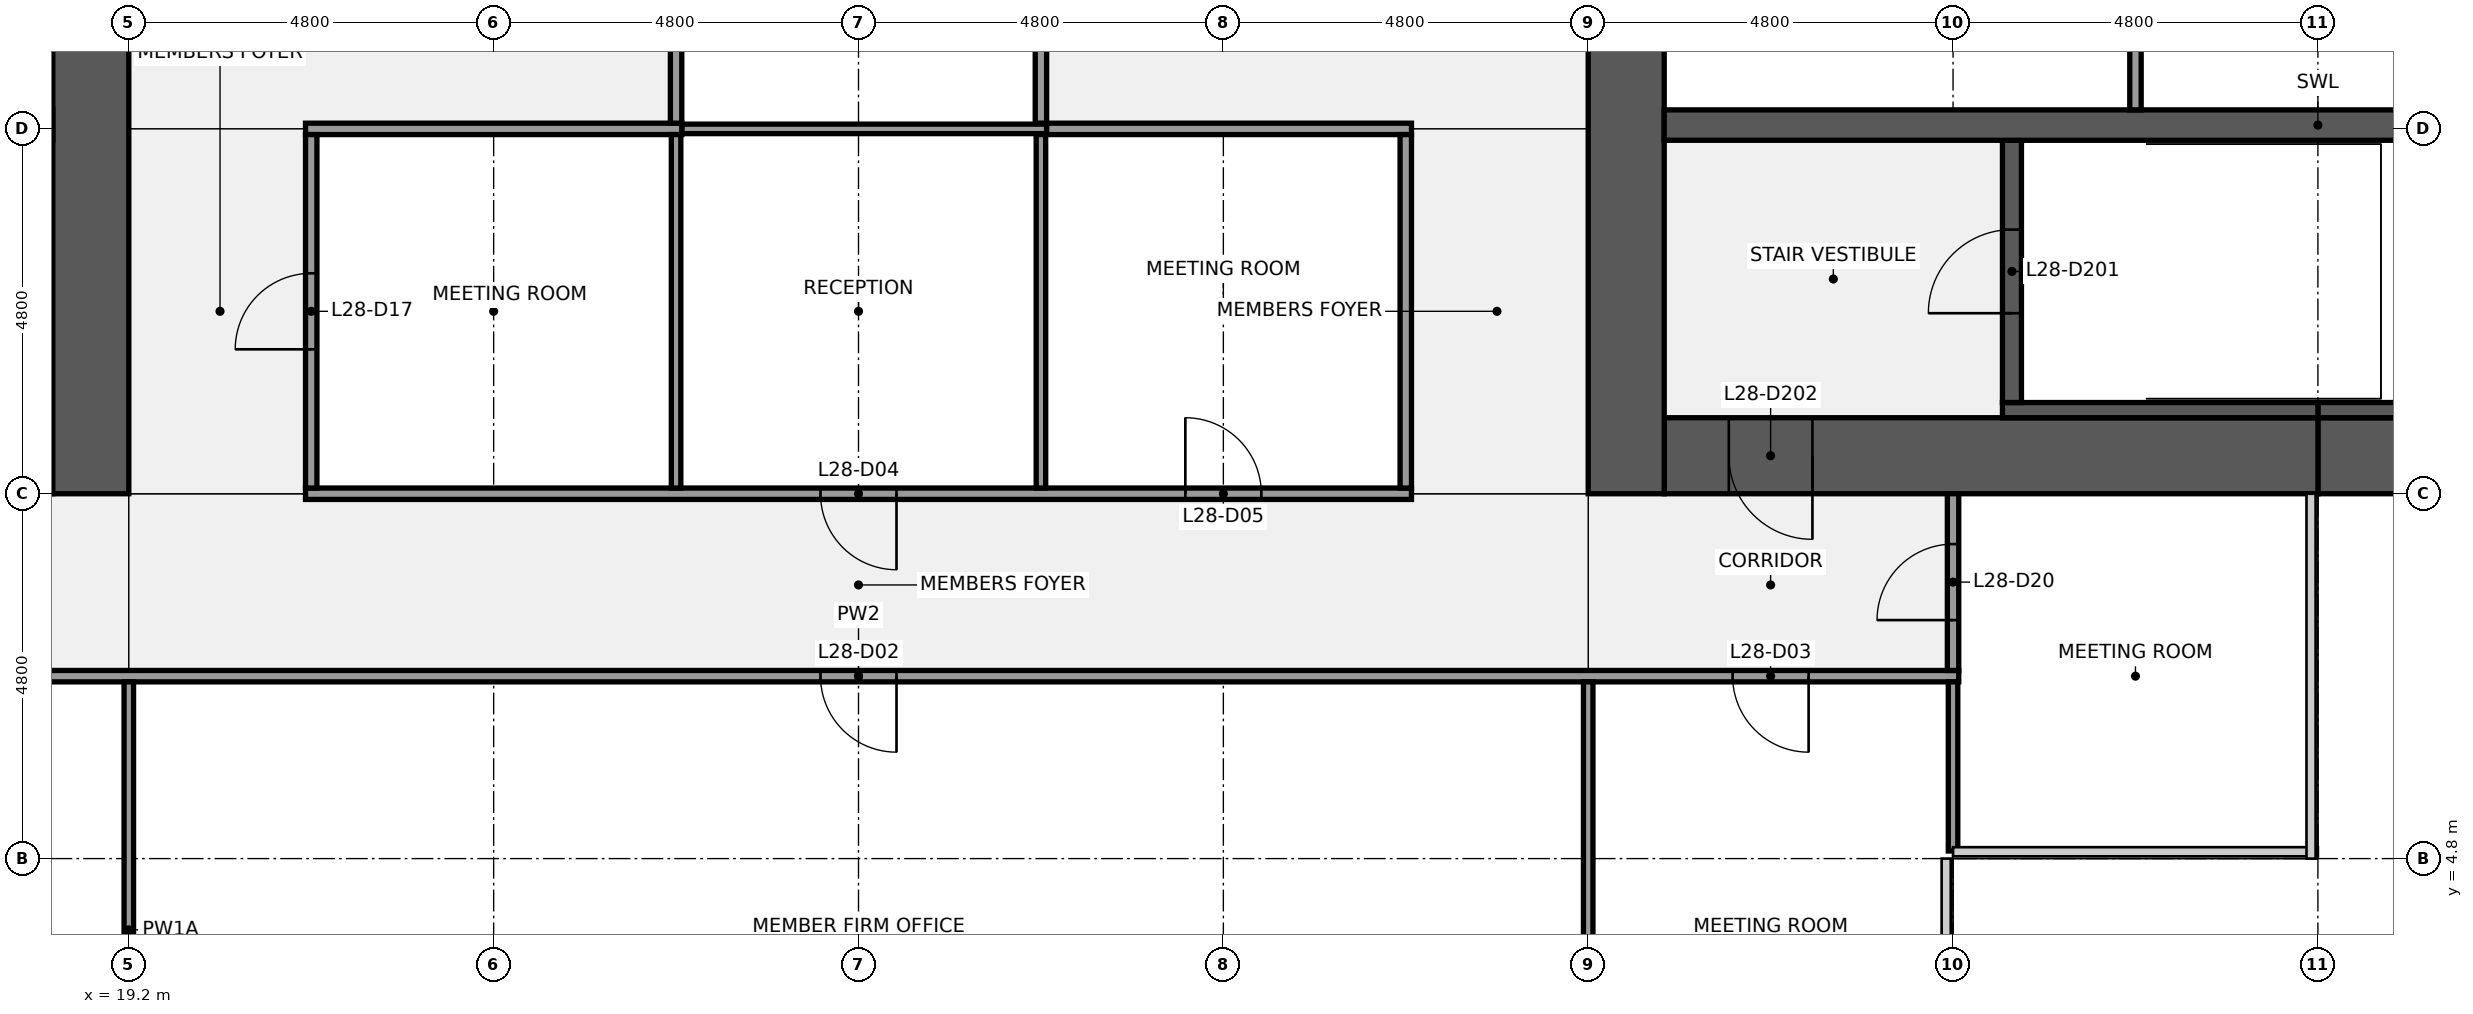
"""IFC4 building model, lengths in metres.
Left out: names, types, materials, properties, quantities, classifications, styles, units other than length and angle.
Written with IfcOpenShell. Run it as: python <this file> out.ifc"""

import sys

from ifc_helpers import new_model, si_unit, direction, frame, frame_2d, origin, place, context, subcontext, project, spatial, rectangle, extrude, element, fill, save


model = new_model("IFC4")
c1 = context("Model", 3, precision=1e-05, world=origin(), true_north=direction((0.0, 1.0)))
c2 = subcontext(c1, "Body", "Model", "MODEL_VIEW")
j1 = project(units=[si_unit("LENGTHUNIT", "METRE"), si_unit("PLANEANGLEUNIT", "RADIAN")], contexts=[c1])
p1 = place(None, origin())
s1 = spatial("IfcSite", under=j1, at=p1, CompositionType="ELEMENT")
p2 = place(p1, origin())
s2 = spatial("IfcBuilding", under=s1, at=p2, CompositionType="ELEMENT")
p3 = place(p2, frame((0.0, 0.0, 132.1)))
s3 = spatial("IfcBuildingStorey", under=s2, at=p3, CompositionType="ELEMENT", Elevation=132.1)
p4 = place(p3, frame((18.2, 10.1, 0.0), z_axis=(0.0, 0.0, 1.0), x_axis=(-1.0, 0.0, 0.0)))
e1 = element("IfcWall", 1, at=p4, inside=s3, PredefinedType="SHEAR", context=c2, shape_type="SweptSolid", body=[
    extrude(rectangle(XDim=8.6, YDim=1.0, at=frame_2d((4.3, 0.0))), origin(), (0.0, 0.0, 1.0), 3.84),
])
p5 = place(p4, frame((0.85, 0.0, 0.0)))
e2 = element("IfcOpeningElement", 2, at=p5, cuts=e1, PredefinedType="OPENING", context=c2, shape_type="SweptSolid", body=[
    extrude(rectangle(XDim=1.1, YDim=2.1, at=frame_2d((0.55, 1.05))), frame((0.0, 0.51, 0.0), z_axis=(0.0, -1.0, 0.0), x_axis=(1.0, 0.0, 0.0)), (0.0, 0.0, 1.0), 1.02),
])
p6 = place(p3, frame((18.7, 38.4, 0.0), z_axis=(0.0, 0.0, 1.0), x_axis=(0.0, -1.0, 0.0)))
e3 = element("IfcWall", 3, at=p6, inside=s3, PredefinedType="SHEAR", context=c2, shape_type="SweptSolid", body=[
    extrude(rectangle(XDim=28.8, YDim=1.0, at=frame_2d((14.4, 0.0))), origin(), (0.0, 0.0, 1.0), 3.84),
])
p7 = place(p6, frame((18.3, 0.0, 0.0)))
e4 = element("IfcOpeningElement", 4, at=p7, cuts=e3, PredefinedType="OPENING", context=c2, shape_type="SweptSolid", body=[
    extrude(rectangle(XDim=1.8, YDim=2.1, at=frame_2d((0.9, 1.05))), frame((0.0, 0.51, 0.0), z_axis=(0.0, -1.0, 0.0), x_axis=(1.0, 0.0, 0.0)), (0.0, 0.0, 1.0), 1.02),
])
p8 = place(p6, frame((8.7, 0.0, 0.0)))
e5 = element("IfcOpeningElement", 5, at=p8, cuts=e3, PredefinedType="OPENING", context=c2, shape_type="SweptSolid", body=[
    extrude(rectangle(XDim=1.8, YDim=2.1, at=frame_2d((0.9, 1.05))), frame((0.0, 0.51, 0.0), z_axis=(0.0, -1.0, 0.0), x_axis=(1.0, 0.0, 0.0)), (0.0, 0.0, 1.0), 1.02),
])
p9 = place(p3, frame((1.0, 14.45, 0.0), z_axis=(0.0, 0.0, 1.0), x_axis=(1.0, 0.0, 0.0)))
e6 = element("IfcWall", 6, at=p9, inside=s3, PredefinedType="SHEAR", context=c2, shape_type="SweptSolid", body=[
    extrude(rectangle(XDim=17.2, YDim=0.4, at=frame_2d((8.6, 0.0))), origin(), (0.0, 0.0, 1.0), 3.84),
])
p10 = place(p3, frame((56.6, 10.1, 0.0), z_axis=(0.0, 0.0, 1.0), x_axis=(-1.0, 0.0, 0.0)))
e7 = element("IfcWall", 7, at=p10, inside=s3, PredefinedType="SHEAR", context=c2, shape_type="SweptSolid", body=[
    extrude(rectangle(XDim=8.6, YDim=1.0, at=frame_2d((4.3, 0.0))), origin(), (0.0, 0.0, 1.0), 3.84),
])
p11 = place(p10, frame((5.3, 0.0, 0.9)))
e8 = element("IfcOpeningElement", 8, at=p11, cuts=e7, PredefinedType="OPENING", context=c2, shape_type="SweptSolid", body=[
    extrude(rectangle(XDim=1.8, YDim=1.5, at=frame_2d((0.9, 0.75))), frame((0.0, 0.51, 0.0), z_axis=(0.0, -1.0, 0.0), x_axis=(1.0, 0.0, 0.0)), (0.0, 0.0, 1.0), 1.02),
])
p12 = place(p3, frame((48.0, 10.1, 0.0), z_axis=(0.0, 0.0, 1.0), x_axis=(-1.0, 0.0, 0.0)))
e9 = element("IfcWall", 9, at=p12, inside=s3, PredefinedType="SHEAR", context=c2, shape_type="SweptSolid", body=[
    extrude(rectangle(XDim=8.6, YDim=1.0, at=frame_2d((4.3, 0.0))), origin(), (0.0, 0.0, 1.0), 3.84),
])
p13 = place(p12, frame((6.65, 0.0, 0.0)))
e10 = element("IfcOpeningElement", 10, at=p13, cuts=e9, PredefinedType="OPENING", context=c2, shape_type="SweptSolid", body=[
    extrude(rectangle(XDim=1.1, YDim=2.1, at=frame_2d((0.55, 1.05))), frame((0.0, 0.51, 0.0), z_axis=(0.0, -1.0, 0.0), x_axis=(1.0, 0.0, 0.0)), (0.0, 0.0, 1.0), 1.02),
])
p14 = place(p3, frame((38.9, 9.6, 0.0), z_axis=(0.0, 0.0, 1.0), x_axis=(0.0, 1.0, 0.0)))
e11 = element("IfcWall", 11, at=p14, inside=s3, PredefinedType="SHEAR", context=c2, shape_type="SweptSolid", body=[
    extrude(rectangle(XDim=28.8, YDim=1.0, at=frame_2d((14.4, 0.0))), origin(), (0.0, 0.0, 1.0), 3.84),
])
p15 = place(p14, frame((8.7, 0.0, 0.0)))
e12 = element("IfcOpeningElement", 12, at=p15, cuts=e11, PredefinedType="OPENING", context=c2, shape_type="SweptSolid", body=[
    extrude(rectangle(XDim=1.8, YDim=2.1, at=frame_2d((0.9, 1.05))), frame((0.0, 0.51, 0.0), z_axis=(0.0, -1.0, 0.0), x_axis=(1.0, 0.0, 0.0)), (0.0, 0.0, 1.0), 1.02),
])
p16 = place(p14, frame((18.3, 0.0, 0.0)))
e13 = element("IfcOpeningElement", 13, at=p16, cuts=e11, PredefinedType="OPENING", context=c2, shape_type="SweptSolid", body=[
    extrude(rectangle(XDim=1.8, YDim=2.1, at=frame_2d((0.9, 1.05))), frame((0.0, 0.51, 0.0), z_axis=(0.0, -1.0, 0.0), x_axis=(1.0, 0.0, 0.0)), (0.0, 0.0, 1.0), 1.02),
])
p17 = place(p3, frame((48.0, 10.7, 0.0), z_axis=(0.0, 0.0, 1.0), x_axis=(1.0, 0.0, 0.0)))
e14 = element("IfcWall", 14, at=p17, inside=s3, PredefinedType="SHEAR", context=c2, shape_type="SweptSolid", body=[
    extrude(rectangle(XDim=3.35, YDim=0.2, at=frame_2d((1.675, 0.0))), origin(), (0.0, 0.0, 1.0), 3.84),
])
p18 = place(p3, frame((43.85, 10.7, 0.0), z_axis=(0.0, 0.0, 1.0), x_axis=(1.0, 0.0, 0.0)))
e15 = element("IfcWall", 15, at=p18, inside=s3, PredefinedType="SHEAR", context=c2, shape_type="SweptSolid", body=[
    extrude(rectangle(XDim=4.15, YDim=0.2, at=frame_2d((2.075, 0.0))), origin(), (0.0, 0.0, 1.0), 3.84),
])
p19 = place(p3, frame((43.975, 10.8, 0.0), z_axis=(0.0, 0.0, 1.0), x_axis=(0.0, 1.0, 0.0)))
e16 = element("IfcWall", 16, at=p19, inside=s3, PredefinedType="SHEAR", context=c2, shape_type="SweptSolid", body=[
    extrude(rectangle(XDim=3.45, YDim=0.25, at=frame_2d((1.725, 0.0))), origin(), (0.0, 0.0, 1.0), 3.84),
])
p20 = place(p19, frame((1.175, 0.0, 0.0)))
e17 = element("IfcOpeningElement", 17, at=p20, cuts=e16, PredefinedType="OPENING", context=c2, shape_type="SweptSolid", body=[
    extrude(rectangle(XDim=1.1, YDim=2.1, at=frame_2d((0.55, 1.05))), frame((0.0, 0.135, 0.0), z_axis=(0.0, -1.0, 0.0), x_axis=(1.0, 0.0, 0.0)), (0.0, 0.0, 1.0), 0.27),
])
p21 = place(p3, frame((39.4, 14.45, 0.0), z_axis=(0.0, 0.0, 1.0), x_axis=(1.0, 0.0, 0.0)))
e18 = element("IfcWall", 18, at=p21, inside=s3, PredefinedType="SHEAR", context=c2, shape_type="SweptSolid", body=[
    extrude(rectangle(XDim=17.2, YDim=0.4, at=frame_2d((8.6, 0.0))), origin(), (0.0, 0.0, 1.0), 3.84),
])
p22 = place(p3, frame((45.6, 14.65, 0.0), z_axis=(0.0, 0.0, 1.0), x_axis=(0.0, 1.0, 0.0)))
e19 = element("IfcWall", 19, at=p22, inside=s3, PredefinedType="PARTITIONING", context=c2, shape_type="SweptSolid", body=[
    extrude(rectangle(XDim=2.6, YDim=0.15, at=frame_2d((1.3, 0.0))), origin(), (0.0, 0.0, 1.0), 3.84),
])
p23 = place(p3, frame((14.325, 7.2, 0.0), z_axis=(0.0, 0.0, 1.0), x_axis=(1.0, 0.0, 0.0)))
e20 = element("IfcWall", 20, at=p23, inside=s3, PredefinedType="PARTITIONING", context=c2, shape_type="SweptSolid", body=[
    extrude(rectangle(XDim=28.95, YDim=0.15, at=frame_2d((14.475, 0.0))), origin(), (0.0, 0.0, 1.0), 2.936),
])
p24 = place(p23, frame((1.975, 0.0, 0.0)))
e21 = element("IfcOpeningElement", 21, at=p24, cuts=e20, PredefinedType="OPENING", context=c2, shape_type="SweptSolid", body=[
    extrude(rectangle(XDim=1.0, YDim=2.1, at=frame_2d((0.5, 1.05))), frame((0.0, 0.085, 0.0), z_axis=(0.0, -1.0, 0.0), x_axis=(1.0, 0.0, 0.0)), (0.0, 0.0, 1.0), 0.17),
])
p25 = place(p23, frame((13.975, 0.0, 0.0)))
e22 = element("IfcOpeningElement", 22, at=p25, cuts=e20, PredefinedType="OPENING", context=c2, shape_type="SweptSolid", body=[
    extrude(rectangle(XDim=1.0, YDim=2.1, at=frame_2d((0.5, 1.05))), frame((0.0, 0.085, 0.0), z_axis=(0.0, -1.0, 0.0), x_axis=(1.0, 0.0, 0.0)), (0.0, 0.0, 1.0), 0.17),
])
p26 = place(p23, frame((25.975, 0.0, 0.0)))
e23 = element("IfcOpeningElement", 23, at=p26, cuts=e20, PredefinedType="OPENING", context=c2, shape_type="SweptSolid", body=[
    extrude(rectangle(XDim=1.0, YDim=2.1, at=frame_2d((0.5, 1.05))), frame((0.0, 0.085, 0.0), z_axis=(0.0, -1.0, 0.0), x_axis=(1.0, 0.0, 0.0)), (0.0, 0.0, 1.0), 0.17),
])
p27 = place(p3, frame((21.525, 9.6, 0.0), z_axis=(0.0, 0.0, 1.0), x_axis=(1.0, 0.0, 0.0)))
e24 = element("IfcWall", 24, at=p27, inside=s3, PredefinedType="PARTITIONING", context=c2, shape_type="SweptSolid", body=[
    extrude(rectangle(XDim=14.55, YDim=0.15, at=frame_2d((7.275, 0.0))), origin(), (0.0, 0.0, 1.0), 2.936),
])
p28 = place(p27, frame((6.775, 0.0, 0.0)))
e25 = element("IfcOpeningElement", 25, at=p28, cuts=e24, PredefinedType="OPENING", context=c2, shape_type="SweptSolid", body=[
    extrude(rectangle(XDim=1.0, YDim=2.1, at=frame_2d((0.5, 1.05))), frame((0.0, 0.085, 0.0), z_axis=(0.0, -1.0, 0.0), x_axis=(1.0, 0.0, 0.0)), (0.0, 0.0, 1.0), 0.17),
])
p29 = place(p27, frame((11.575, 0.0, 0.0)))
e26 = element("IfcOpeningElement", 26, at=p29, cuts=e24, PredefinedType="OPENING", context=c2, shape_type="SweptSolid", body=[
    extrude(rectangle(XDim=1.0, YDim=2.1, at=frame_2d((0.5, 1.05))), frame((0.0, 0.085, 0.0), z_axis=(0.0, -1.0, 0.0), x_axis=(1.0, 0.0, 0.0)), (0.0, 0.0, 1.0), 0.17),
])
p30 = place(p3, frame((26.475, 14.4, 0.0), z_axis=(0.0, 0.0, 1.0), x_axis=(1.0, 0.0, 0.0)))
e27 = element("IfcWall", 27, at=p30, inside=s3, PredefinedType="PARTITIONING", context=c2, shape_type="SweptSolid", body=[
    extrude(rectangle(XDim=4.8, YDim=0.125, at=frame_2d((2.4, 0.0))), origin(), (0.0, 0.0, 1.0), 2.936),
])
p31 = place(p3, frame((21.525, 14.4, 0.0), z_axis=(0.0, 0.0, 1.0), x_axis=(1.0, 0.0, 0.0)))
e28 = element("IfcWall", 28, at=p31, inside=s3, PredefinedType="PARTITIONING", context=c2, shape_type="SweptSolid", body=[
    extrude(rectangle(XDim=4.95, YDim=0.15, at=frame_2d((2.475, 0.0))), origin(), (0.0, 0.0, 1.0), 2.936),
])
p32 = place(p3, frame((31.275, 14.4, 0.0), z_axis=(0.0, 0.0, 1.0), x_axis=(1.0, 0.0, 0.0)))
e29 = element("IfcWall", 29, at=p32, inside=s3, PredefinedType="PARTITIONING", context=c2, shape_type="SweptSolid", body=[
    extrude(rectangle(XDim=4.8, YDim=0.15, at=frame_2d((2.4, 0.0))), origin(), (0.0, 0.0, 1.0), 2.936),
])
p33 = place(p3, frame((19.2, 0.6, 0.0), z_axis=(0.0, 0.0, 1.0), x_axis=(0.0, 1.0, 0.0)))
e30 = element("IfcWall", 30, at=p33, inside=s3, PredefinedType="PARTITIONING", context=c2, shape_type="SweptSolid", body=[
    extrude(rectangle(XDim=6.525, YDim=0.125, at=frame_2d((3.262, 0.0))), origin(), (0.0, 0.0, 1.0), 2.936),
])
p34 = place(p3, frame((21.6, 9.675, 0.0), z_axis=(0.0, 0.0, 1.0), x_axis=(0.0, 1.0, 0.0)))
e31 = element("IfcWall", 31, at=p34, inside=s3, PredefinedType="PARTITIONING", context=c2, shape_type="SweptSolid", body=[
    extrude(rectangle(XDim=4.65, YDim=0.15, at=frame_2d((2.325, 0.0))), origin(), (0.0, 0.0, 1.0), 2.936),
])
p35 = place(p34, frame((1.825, 0.0, 0.0)))
e32 = element("IfcOpeningElement", 32, at=p35, cuts=e31, PredefinedType="OPENING", context=c2, shape_type="SweptSolid", body=[
    extrude(rectangle(XDim=1.0, YDim=2.1, at=frame_2d((0.5, 1.05))), frame((0.0, 0.085, 0.0), z_axis=(0.0, -1.0, 0.0), x_axis=(1.0, 0.0, 0.0)), (0.0, 0.0, 1.0), 0.17),
])
p36 = place(p3, frame((26.4, 9.675, 0.0), z_axis=(0.0, 0.0, 1.0), x_axis=(0.0, 1.0, 0.0)))
e33 = element("IfcWall", 33, at=p36, inside=s3, PredefinedType="PARTITIONING", context=c2, shape_type="SweptSolid", body=[
    extrude(rectangle(XDim=4.65, YDim=0.125, at=frame_2d((2.325, 0.0))), origin(), (0.0, 0.0, 1.0), 2.936),
])
p37 = place(p3, frame((26.4, 14.475, 0.0), z_axis=(0.0, 0.0, 1.0), x_axis=(0.0, 1.0, 0.0)))
e34 = element("IfcWall", 34, at=p37, inside=s3, PredefinedType="PARTITIONING", context=c2, shape_type="SweptSolid", body=[
    extrude(rectangle(XDim=10.65, YDim=0.15, at=frame_2d((5.325, 0.0))), origin(), (0.0, 0.0, 1.0), 2.936),
])
p38 = place(p37, frame((4.825, 0.0, 0.0)))
e35 = element("IfcOpeningElement", 35, at=p38, cuts=e34, PredefinedType="OPENING", context=c2, shape_type="SweptSolid", body=[
    extrude(rectangle(XDim=1.0, YDim=2.1, at=frame_2d((0.5, 1.05))), frame((0.0, 0.085, 0.0), z_axis=(0.0, -1.0, 0.0), x_axis=(1.0, 0.0, 0.0)), (0.0, 0.0, 1.0), 0.17),
])
p39 = place(p3, frame((31.2, 9.675, 0.0), z_axis=(0.0, 0.0, 1.0), x_axis=(0.0, 1.0, 0.0)))
e36 = element("IfcWall", 36, at=p39, inside=s3, PredefinedType="PARTITIONING", context=c2, shape_type="SweptSolid", body=[
    extrude(rectangle(XDim=4.65, YDim=0.125, at=frame_2d((2.325, 0.0))), origin(), (0.0, 0.0, 1.0), 2.936),
])
p40 = place(p3, frame((31.2, 14.475, 0.0), z_axis=(0.0, 0.0, 1.0), x_axis=(0.0, 1.0, 0.0)))
e37 = element("IfcWall", 37, at=p40, inside=s3, PredefinedType="PARTITIONING", context=c2, shape_type="SweptSolid", body=[
    extrude(rectangle(XDim=10.65, YDim=0.15, at=frame_2d((5.325, 0.0))), origin(), (0.0, 0.0, 1.0), 2.936),
])
p41 = place(p3, frame((36.0, 9.675, 0.0), z_axis=(0.0, 0.0, 1.0), x_axis=(0.0, 1.0, 0.0)))
e38 = element("IfcWall", 38, at=p41, inside=s3, PredefinedType="PARTITIONING", context=c2, shape_type="SweptSolid", body=[
    extrude(rectangle(XDim=4.65, YDim=0.15, at=frame_2d((2.325, 0.0))), origin(), (0.0, 0.0, 1.0), 2.936),
])
p42 = place(p3, frame((38.4, 0.6, 0.0), z_axis=(0.0, 0.0, 1.0), x_axis=(0.0, 1.0, 0.0)))
e39 = element("IfcWall", 39, at=p42, inside=s3, PredefinedType="PARTITIONING", context=c2, shape_type="SweptSolid", body=[
    extrude(rectangle(XDim=6.525, YDim=0.125, at=frame_2d((3.262, 0.0))), origin(), (0.0, 0.0, 1.0), 2.936),
])
p43 = place(p3, frame((43.2, 4.9, 0.0), z_axis=(0.0, 0.0, 1.0), x_axis=(0.0, 1.0, 0.0)))
e40 = element("IfcWall", 40, at=p43, inside=s3, PredefinedType="PARTITIONING", context=c2, shape_type="SweptSolid", body=[
    extrude(rectangle(XDim=2.225, YDim=0.125, at=frame_2d((1.113, 0.0))), origin(), (0.0, 0.0, 1.0), 2.936),
])
p44 = place(p3, frame((43.2, 7.275, 0.0), z_axis=(0.0, 0.0, 1.0), x_axis=(0.0, 1.0, 0.0)))
e41 = element("IfcWall", 41, at=p44, inside=s3, PredefinedType="PARTITIONING", context=c2, shape_type="SweptSolid", body=[
    extrude(rectangle(XDim=2.325, YDim=0.15, at=frame_2d((1.163, 0.0))), origin(), (0.0, 0.0, 1.0), 2.936),
])
p45 = place(p44, frame((0.663, 0.0, 0.0)))
e42 = element("IfcOpeningElement", 42, at=p45, cuts=e41, PredefinedType="OPENING", context=c2, shape_type="SweptSolid", body=[
    extrude(rectangle(XDim=1.0, YDim=2.1, at=frame_2d((0.5, 1.05))), frame((0.0, 0.085, 0.0), z_axis=(0.0, -1.0, 0.0), x_axis=(1.0, 0.0, 0.0)), (0.0, 0.0, 1.0), 0.17),
])
p46 = place(p20, origin())
e43 = element("IfcDoor", 43, at=p46, inside=s3, OperationType="SINGLE_SWING_LEFT", PredefinedType="DOOR", context=c2, shape_type="SweptSolid", body=[
    extrude(rectangle(XDim=1.1, YDim=2.1, at=frame_2d((0.55, 1.05))), frame((0.0, 0.025, 0.0), z_axis=(0.0, -1.0, 0.0), x_axis=(1.0, 0.0, 0.0)), (0.0, 0.0, 1.0), 0.05),
])
fill(e17, e43)
p47 = place(p13, origin())
e44 = element("IfcDoor", 44, at=p47, inside=s3, OperationType="SINGLE_SWING_LEFT", PredefinedType="DOOR", context=c2, shape_type="SweptSolid", body=[
    extrude(rectangle(XDim=1.1, YDim=2.1, at=frame_2d((0.55, 1.05))), frame((0.0, 0.025, 0.0), z_axis=(0.0, -1.0, 0.0), x_axis=(1.0, 0.0, 0.0)), (0.0, 0.0, 1.0), 0.05),
])
fill(e10, e44)
p48 = place(p25, origin())
e45 = element("IfcDoor", 45, at=p48, inside=s3, OperationType="SINGLE_SWING_RIGHT", PredefinedType="DOOR", context=c2, shape_type="SweptSolid", body=[
    extrude(rectangle(XDim=1.0, YDim=2.1, at=frame_2d((0.5, 1.05))), frame((0.0, 0.025, 0.0), z_axis=(0.0, -1.0, 0.0), x_axis=(1.0, 0.0, 0.0)), (0.0, 0.0, 1.0), 0.05),
])
fill(e22, e45)
p49 = place(p26, origin())
e46 = element("IfcDoor", 46, at=p49, inside=s3, OperationType="SINGLE_SWING_RIGHT", PredefinedType="DOOR", context=c2, shape_type="SweptSolid", body=[
    extrude(rectangle(XDim=1.0, YDim=2.1, at=frame_2d((0.5, 1.05))), frame((0.0, 0.025, 0.0), z_axis=(0.0, -1.0, 0.0), x_axis=(1.0, 0.0, 0.0)), (0.0, 0.0, 1.0), 0.05),
])
fill(e23, e46)
p50 = place(p28, origin())
e47 = element("IfcDoor", 47, at=p50, inside=s3, OperationType="SINGLE_SWING_RIGHT", PredefinedType="DOOR", context=c2, shape_type="SweptSolid", body=[
    extrude(rectangle(XDim=1.0, YDim=2.1, at=frame_2d((0.5, 1.05))), frame((0.0, 0.025, 0.0), z_axis=(0.0, -1.0, 0.0), x_axis=(1.0, 0.0, 0.0)), (0.0, 0.0, 1.0), 0.05),
])
fill(e25, e47)
p51 = place(p29, origin())
e48 = element("IfcDoor", 48, at=p51, inside=s3, OperationType="SINGLE_SWING_LEFT", PredefinedType="DOOR", context=c2, shape_type="SweptSolid", body=[
    extrude(rectangle(XDim=1.0, YDim=2.1, at=frame_2d((0.5, 1.05))), frame((0.0, 0.025, 0.0), z_axis=(0.0, -1.0, 0.0), x_axis=(1.0, 0.0, 0.0)), (0.0, 0.0, 1.0), 0.05),
])
fill(e26, e48)
p52 = place(p35, origin())
e49 = element("IfcDoor", 49, at=p52, inside=s3, OperationType="SINGLE_SWING_LEFT", PredefinedType="DOOR", context=c2, shape_type="SweptSolid", body=[
    extrude(rectangle(XDim=1.0, YDim=2.1, at=frame_2d((0.5, 1.05))), frame((0.0, 0.025, 0.0), z_axis=(0.0, -1.0, 0.0), x_axis=(1.0, 0.0, 0.0)), (0.0, 0.0, 1.0), 0.05),
])
fill(e32, e49)
p53 = place(p45, origin())
e50 = element("IfcDoor", 50, at=p53, inside=s3, OperationType="SINGLE_SWING_LEFT", PredefinedType="DOOR", context=c2, shape_type="SweptSolid", body=[
    extrude(rectangle(XDim=1.0, YDim=2.1, at=frame_2d((0.5, 1.05))), frame((0.0, 0.025, 0.0), z_axis=(0.0, -1.0, 0.0), x_axis=(1.0, 0.0, 0.0)), (0.0, 0.0, 1.0), 0.05),
])
fill(e42, e50)
save(model, sys.argv[1])
